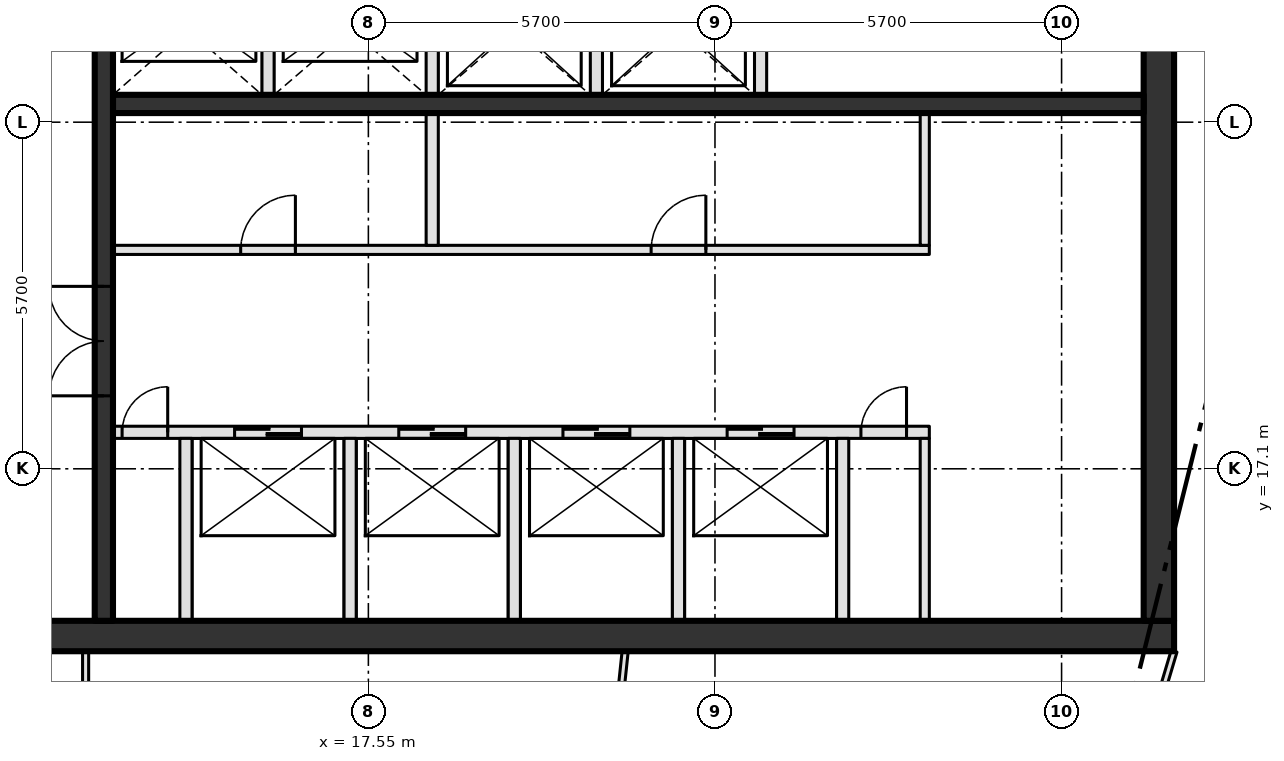
"""IFC4 building model, lengths in metres.
Left out: names, types, materials, properties, quantities, classifications, styles, units other than length and angle.
Written with IfcOpenShell. Run it as: python <this file> out.ifc"""

import sys

from ifc_helpers import new_model, si_unit, direction, frame, frame_2d, origin, place, context, subcontext, project, spatial, rectangle, extrude, element, fill, save


model = new_model("IFC4")
c1 = context("Model", 3, precision=1e-05, world=origin(), true_north=direction((0.0, 1.0)))
c2 = subcontext(c1, "Body", "Model", "MODEL_VIEW")
j1 = project(units=[si_unit("LENGTHUNIT", "METRE"), si_unit("PLANEANGLEUNIT", "RADIAN")], contexts=[c1])
p1 = place(None, origin())
s1 = spatial("IfcSite", under=j1, at=p1, CompositionType="ELEMENT")
p2 = place(p1, origin())
s2 = spatial("IfcBuilding", under=s1, at=p2, CompositionType="ELEMENT")
p3 = place(p2, frame((0.0, 0.0, 387.6)))
s3 = spatial("IfcBuildingStorey", under=s2, at=p3, CompositionType="ELEMENT", Elevation=387.6)
p4 = place(p3, frame((8.0, 14.35, -0.3), z_axis=(0.0, 0.0, 1.0), x_axis=(1.0, 0.0, 0.0)))
e1 = element("IfcWall", 1, at=p4, inside=s3, PredefinedType="SHEAR", context=c2, shape_type="SweptSolid", body=[
    extrude(rectangle(XDim=22.8, YDim=0.5, at=frame_2d((11.4, 0.0))), origin(), (0.0, 0.0, 1.0), 4.2),
])
p5 = place(p4, frame((2.3, 0.0, 0.3)))
e2 = element("IfcOpeningElement", 2, at=p5, cuts=e1, PredefinedType="OPENING", context=c2, shape_type="SweptSolid", body=[
    extrude(rectangle(XDim=1.8, YDim=2.1, at=frame_2d((0.9, 1.05))), frame((0.0, 0.26, 0.0), z_axis=(0.0, -1.0, 0.0), x_axis=(1.0, 0.0, 0.0)), (0.0, 0.0, 1.0), 0.52),
])
p6 = place(p3, frame((30.55, 14.6, -0.3), z_axis=(0.0, 0.0, 1.0), x_axis=(0.0, 1.0, 0.0)))
e3 = element("IfcWall", 3, at=p6, inside=s3, PredefinedType="SHEAR", context=c2, shape_type="SweptSolid", body=[
    extrude(rectangle(XDim=21.1, YDim=0.5, at=frame_2d((10.55, 0.0))), origin(), (0.0, 0.0, 1.0), 4.2),
])
p7 = place(p3, frame((13.35, 17.7, 0.0), z_axis=(0.0, 0.0, 1.0), x_axis=(1.0, 0.0, 0.0)))
e4 = element("IfcWall", 4, at=p7, inside=s3, PredefinedType="SOLIDWALL", context=c2, shape_type="SweptSolid", body=[
    extrude(rectangle(XDim=13.425, YDim=0.2, at=frame_2d((6.712, 0.0))), origin(), (0.0, 0.0, 1.0), 3.9),
])
p8 = place(p7, frame((2.0, 0.0, 0.0)))
e5 = element("IfcOpeningElement", 5, at=p8, cuts=e4, PredefinedType="OPENING", context=c2, shape_type="SweptSolid", body=[
    extrude(rectangle(XDim=1.1, YDim=2.1, at=frame_2d((0.55, 1.05))), frame((0.0, 0.11, 0.0), z_axis=(0.0, -1.0, 0.0), x_axis=(1.0, 0.0, 0.0)), (0.0, 0.0, 1.0), 0.22),
])
p9 = place(p7, frame((4.7, 0.0, 0.0)))
e6 = element("IfcOpeningElement", 6, at=p9, cuts=e4, PredefinedType="OPENING", context=c2, shape_type="SweptSolid", body=[
    extrude(rectangle(XDim=1.1, YDim=2.1, at=frame_2d((0.55, 1.05))), frame((0.0, 0.11, 0.0), z_axis=(0.0, -1.0, 0.0), x_axis=(1.0, 0.0, 0.0)), (0.0, 0.0, 1.0), 0.22),
])
p10 = place(p7, frame((7.4, 0.0, 0.0)))
e7 = element("IfcOpeningElement", 7, at=p10, cuts=e4, PredefinedType="OPENING", context=c2, shape_type="SweptSolid", body=[
    extrude(rectangle(XDim=1.1, YDim=2.1, at=frame_2d((0.55, 1.05))), frame((0.0, 0.11, 0.0), z_axis=(0.0, -1.0, 0.0), x_axis=(1.0, 0.0, 0.0)), (0.0, 0.0, 1.0), 0.22),
])
p11 = place(p7, frame((10.1, 0.0, 0.0)))
e8 = element("IfcOpeningElement", 8, at=p11, cuts=e4, PredefinedType="OPENING", context=c2, shape_type="SweptSolid", body=[
    extrude(rectangle(XDim=1.1, YDim=2.1, at=frame_2d((0.55, 1.05))), frame((0.0, 0.11, 0.0), z_axis=(0.0, -1.0, 0.0), x_axis=(1.0, 0.0, 0.0)), (0.0, 0.0, 1.0), 0.22),
])
p12 = place(p7, frame((0.15, 0.0, 0.0)))
e9 = element("IfcOpeningElement", 9, at=p12, cuts=e4, PredefinedType="OPENING", context=c2, shape_type="SweptSolid", body=[
    extrude(rectangle(XDim=0.75, YDim=2.1, at=frame_2d((0.375, 1.05))), frame((0.0, 0.11, 0.0), z_axis=(0.0, -1.0, 0.0), x_axis=(1.0, 0.0, 0.0)), (0.0, 0.0, 1.0), 0.22),
])
p13 = place(p7, frame((12.3, 0.0, 0.0)))
e10 = element("IfcOpeningElement", 10, at=p13, cuts=e4, PredefinedType="OPENING", context=c2, shape_type="SweptSolid", body=[
    extrude(rectangle(XDim=0.75, YDim=2.1, at=frame_2d((0.375, 1.05))), frame((0.0, 0.11, 0.0), z_axis=(0.0, -1.0, 0.0), x_axis=(1.0, 0.0, 0.0)), (0.0, 0.0, 1.0), 0.22),
])
p14 = place(p3, frame((13.35, 20.7, 0.0), z_axis=(0.0, 0.0, 1.0), x_axis=(1.0, 0.0, 0.0)))
e11 = element("IfcWall", 11, at=p14, inside=s3, PredefinedType="PARTITIONING", context=c2, shape_type="SweptSolid", body=[
    extrude(rectangle(XDim=13.425, YDim=0.15, at=frame_2d((6.712, 0.0))), origin(), (0.0, 0.0, 1.0), 3.9),
])
p15 = place(p14, frame((2.1, 0.0, 0.0)))
e12 = element("IfcOpeningElement", 12, at=p15, cuts=e11, PredefinedType="OPENING", context=c2, shape_type="SweptSolid", body=[
    extrude(rectangle(XDim=0.9, YDim=2.1, at=frame_2d((0.45, 1.05))), frame((0.0, 0.085, 0.0), z_axis=(0.0, -1.0, 0.0), x_axis=(1.0, 0.0, 0.0)), (0.0, 0.0, 1.0), 0.17),
])
p16 = place(p14, frame((8.85, 0.0, 0.0)))
e13 = element("IfcOpeningElement", 13, at=p16, cuts=e11, PredefinedType="OPENING", context=c2, shape_type="SweptSolid", body=[
    extrude(rectangle(XDim=0.9, YDim=2.1, at=frame_2d((0.45, 1.05))), frame((0.0, 0.085, 0.0), z_axis=(0.0, -1.0, 0.0), x_axis=(1.0, 0.0, 0.0)), (0.0, 0.0, 1.0), 0.17),
])
p17 = place(p3, frame((13.35, 23.1, 0.0), z_axis=(0.0, 0.0, 1.0), x_axis=(1.0, 0.0, 0.0)))
e14 = element("IfcWall", 14, at=p17, inside=s3, PredefinedType="SHEAR", context=c2, shape_type="SweptSolid", body=[
    extrude(rectangle(XDim=16.95, YDim=0.3, at=frame_2d((8.475, 0.0))), origin(), (0.0, 0.0, 1.0), 3.9),
])
p18 = place(p3, frame((13.2, 14.6, 0.0), z_axis=(0.0, 0.0, 1.0), x_axis=(0.0, 1.0, 0.0)))
e15 = element("IfcWall", 15, at=p18, inside=s3, PredefinedType="SHEAR", context=c2, shape_type="SweptSolid", body=[
    extrude(rectangle(XDim=21.1, YDim=0.3, at=frame_2d((10.55, 0.0))), origin(), (0.0, 0.0, 1.0), 3.9),
])
p19 = place(p18, frame((3.7, 0.0, 0.0)))
e16 = element("IfcOpeningElement", 16, at=p19, cuts=e15, PredefinedType="OPENING", context=c2, shape_type="SweptSolid", body=[
    extrude(rectangle(XDim=1.8, YDim=2.1, at=frame_2d((0.9, 1.05))), frame((0.0, 0.16, 0.0), z_axis=(0.0, -1.0, 0.0), x_axis=(1.0, 0.0, 0.0)), (0.0, 0.0, 1.0), 0.32),
])
p20 = place(p18, frame((11.8, 0.0, 0.0)))
e17 = element("IfcOpeningElement", 17, at=p20, cuts=e15, PredefinedType="OPENING", context=c2, shape_type="SweptSolid", body=[
    extrude(rectangle(XDim=1.2, YDim=2.1, at=frame_2d((0.6, 1.05))), frame((0.0, 0.16, 0.0), z_axis=(0.0, -1.0, 0.0), x_axis=(1.0, 0.0, 0.0)), (0.0, 0.0, 1.0), 0.32),
])
p21 = place(p3, frame((14.55, 14.6, 0.0), z_axis=(0.0, 0.0, 1.0), x_axis=(0.0, 1.0, 0.0)))
e18 = element("IfcWall", 18, at=p21, inside=s3, PredefinedType="SOLIDWALL", context=c2, shape_type="SweptSolid", body=[
    extrude(rectangle(XDim=3.0, YDim=0.2, at=frame_2d((1.5, 0.0))), origin(), (0.0, 0.0, 1.0), 3.9),
])
p22 = place(p3, frame((15.9, 23.25, 0.0), z_axis=(0.0, 0.0, 1.0), x_axis=(0.0, 1.0, 0.0)))
e19 = element("IfcWall", 19, at=p22, inside=s3, PredefinedType="SOLIDWALL", context=c2, shape_type="SweptSolid", body=[
    extrude(rectangle(XDim=2.15, YDim=0.2, at=frame_2d((1.075, 0.0))), origin(), (0.0, 0.0, 1.0), 3.9),
])
p23 = place(p3, frame((17.25, 14.6, 0.0), z_axis=(0.0, 0.0, 1.0), x_axis=(0.0, 1.0, 0.0)))
e20 = element("IfcWall", 20, at=p23, inside=s3, PredefinedType="SOLIDWALL", context=c2, shape_type="SweptSolid", body=[
    extrude(rectangle(XDim=3.0, YDim=0.2, at=frame_2d((1.5, 0.0))), origin(), (0.0, 0.0, 1.0), 3.9),
])
p24 = place(p3, frame((18.6, 20.775, 0.0), z_axis=(0.0, 0.0, 1.0), x_axis=(0.0, 1.0, 0.0)))
e21 = element("IfcWall", 21, at=p24, inside=s3, PredefinedType="SOLIDWALL", context=c2, shape_type="SweptSolid", body=[
    extrude(rectangle(XDim=7.625, YDim=0.2, at=frame_2d((3.812, 0.0))), origin(), (0.0, 0.0, 1.0), 3.9),
])
p25 = place(p24, frame((5.625, 0.0, 0.0)))
e22 = element("IfcOpeningElement", 22, at=p25, cuts=e21, PredefinedType="OPENING", context=c2, shape_type="SweptSolid", body=[
    extrude(rectangle(XDim=1.2, YDim=2.1, at=frame_2d((0.6, 1.05))), frame((0.0, 0.11, 0.0), z_axis=(0.0, -1.0, 0.0), x_axis=(1.0, 0.0, 0.0)), (0.0, 0.0, 1.0), 0.22),
])
p26 = place(p3, frame((19.95, 14.6, 0.0), z_axis=(0.0, 0.0, 1.0), x_axis=(0.0, 1.0, 0.0)))
e23 = element("IfcWall", 23, at=p26, inside=s3, PredefinedType="SOLIDWALL", context=c2, shape_type="SweptSolid", body=[
    extrude(rectangle(XDim=3.0, YDim=0.2, at=frame_2d((1.5, 0.0))), origin(), (0.0, 0.0, 1.0), 3.9),
])
p27 = place(p3, frame((21.3, 23.25, 0.0), z_axis=(0.0, 0.0, 1.0), x_axis=(0.0, 1.0, 0.0)))
e24 = element("IfcWall", 24, at=p27, inside=s3, PredefinedType="SOLIDWALL", context=c2, shape_type="SweptSolid", body=[
    extrude(rectangle(XDim=2.15, YDim=0.2, at=frame_2d((1.075, 0.0))), origin(), (0.0, 0.0, 1.0), 3.9),
])
p28 = place(p3, frame((22.65, 14.6, 0.0), z_axis=(0.0, 0.0, 1.0), x_axis=(0.0, 1.0, 0.0)))
e25 = element("IfcWall", 25, at=p28, inside=s3, PredefinedType="SOLIDWALL", context=c2, shape_type="SweptSolid", body=[
    extrude(rectangle(XDim=3.0, YDim=0.2, at=frame_2d((1.5, 0.0))), origin(), (0.0, 0.0, 1.0), 3.9),
])
p29 = place(p3, frame((24.0, 23.25, 0.0), z_axis=(0.0, 0.0, 1.0), x_axis=(0.0, 1.0, 0.0)))
e26 = element("IfcWall", 26, at=p29, inside=s3, PredefinedType="SOLIDWALL", context=c2, shape_type="SweptSolid", body=[
    extrude(rectangle(XDim=2.15, YDim=0.2, at=frame_2d((1.075, 0.0))), origin(), (0.0, 0.0, 1.0), 3.9),
])
p30 = place(p3, frame((25.35, 14.6, 0.0), z_axis=(0.0, 0.0, 1.0), x_axis=(0.0, 1.0, 0.0)))
e27 = element("IfcWall", 27, at=p30, inside=s3, PredefinedType="SOLIDWALL", context=c2, shape_type="SweptSolid", body=[
    extrude(rectangle(XDim=3.0, YDim=0.2, at=frame_2d((1.5, 0.0))), origin(), (0.0, 0.0, 1.0), 3.9),
])
p31 = place(p3, frame((26.7, 14.6, 0.0), z_axis=(0.0, 0.0, 1.0), x_axis=(0.0, 1.0, 0.0)))
e28 = element("IfcWall", 28, at=p31, inside=s3, PredefinedType="PARTITIONING", context=c2, shape_type="SweptSolid", body=[
    extrude(rectangle(XDim=3.0, YDim=0.15, at=frame_2d((1.5, 0.0))), origin(), (0.0, 0.0, 1.0), 3.9),
])
p32 = place(p3, frame((26.7, 20.775, 0.0), z_axis=(0.0, 0.0, 1.0), x_axis=(0.0, 1.0, 0.0)))
e29 = element("IfcWall", 29, at=p32, inside=s3, PredefinedType="PARTITIONING", context=c2, shape_type="SweptSolid", body=[
    extrude(rectangle(XDim=2.175, YDim=0.15, at=frame_2d((1.087, 0.0))), origin(), (0.0, 0.0, 1.0), 3.9),
])
p33 = place(p3, frame((12.9, 10.078, 0.0), z_axis=(0.0, 0.0, 1.0), x_axis=(0.0, 1.0, 0.0)))
e30 = element("IfcWall", 30, at=p33, inside=s3, PredefinedType="PARTITIONING", context=c2, shape_type="SweptSolid", body=[
    extrude(rectangle(XDim=4.022, YDim=0.1, at=frame_2d((2.011, 0.0))), origin(), (0.0, 0.0, 1.0), 3.9),
])
p34 = place(p33, frame((1.58, 0.0, 0.0)))
e31 = element("IfcOpeningElement", 31, at=p34, cuts=e30, PredefinedType="OPENING", context=c2, shape_type="SweptSolid", body=[
    extrude(rectangle(XDim=1.0, YDim=2.1, at=frame_2d((0.5, 1.05))), frame((0.0, 0.06, 0.0), z_axis=(0.0, -1.0, 0.0), x_axis=(1.0, 0.0, 0.0)), (0.0, 0.0, 1.0), 0.12),
])
p35 = place(p3, frame((30.8, 14.1, 0.0), z_axis=(0.0, 0.0, 1.0), x_axis=(-0.286170650389, -0.958178667502, 0.0)))
e32 = element("IfcWall", 32, at=p35, inside=s3, PredefinedType="PARTITIONING", context=c2, shape_type="SweptSolid", body=[
    extrude(rectangle(XDim=8.716, YDim=0.1, at=frame_2d((4.358, 0.0))), origin(), (0.0, 0.0, 1.0), 3.9),
])
p36 = place(p35, frame((3.58, 0.0, 0.0)))
e33 = element("IfcOpeningElement", 33, at=p36, cuts=e32, PredefinedType="OPENING", context=c2, shape_type="SweptSolid", body=[
    extrude(rectangle(XDim=1.0, YDim=2.1, at=frame_2d((0.5, 1.05))), frame((0.0, 0.06, 0.0), z_axis=(0.0, -1.0, 0.0), x_axis=(1.0, 0.0, 0.0)), (0.0, 0.0, 1.0), 0.12),
])
p37 = place(p3, frame((21.09, 7.606, 0.0), z_axis=(0.0, 0.0, 1.0), x_axis=(0.104573849471, 0.994517124039, 0.0)))
e34 = element("IfcWall", 34, at=p37, inside=s3, PredefinedType="PARTITIONING", context=c2, shape_type="SweptSolid", body=[
    extrude(rectangle(XDim=6.53, YDim=0.1, at=frame_2d((3.265, 0.0))), origin(), (0.0, 0.0, 1.0), 3.9),
])
p38 = place(p8, origin())
e35 = element("IfcDoor", 35, at=p38, inside=s3, OperationType="SLIDING_TO_LEFT", PredefinedType="DOOR", context=c2, shape_type="SweptSolid", body=[
    extrude(rectangle(XDim=1.1, YDim=2.1, at=frame_2d((0.55, 1.05))), frame((0.0, 0.025, 0.0), z_axis=(0.0, -1.0, 0.0), x_axis=(1.0, 0.0, 0.0)), (0.0, 0.0, 1.0), 0.05),
])
fill(e5, e35)
p39 = place(p9, origin())
e36 = element("IfcDoor", 36, at=p39, inside=s3, OperationType="SLIDING_TO_LEFT", PredefinedType="DOOR", context=c2, shape_type="SweptSolid", body=[
    extrude(rectangle(XDim=1.1, YDim=2.1, at=frame_2d((0.55, 1.05))), frame((0.0, 0.025, 0.0), z_axis=(0.0, -1.0, 0.0), x_axis=(1.0, 0.0, 0.0)), (0.0, 0.0, 1.0), 0.05),
])
fill(e6, e36)
p40 = place(p10, origin())
e37 = element("IfcDoor", 37, at=p40, inside=s3, OperationType="SLIDING_TO_LEFT", PredefinedType="DOOR", context=c2, shape_type="SweptSolid", body=[
    extrude(rectangle(XDim=1.1, YDim=2.1, at=frame_2d((0.55, 1.05))), frame((0.0, 0.025, 0.0), z_axis=(0.0, -1.0, 0.0), x_axis=(1.0, 0.0, 0.0)), (0.0, 0.0, 1.0), 0.05),
])
fill(e7, e37)
p41 = place(p11, origin())
e38 = element("IfcDoor", 38, at=p41, inside=s3, OperationType="SLIDING_TO_LEFT", PredefinedType="DOOR", context=c2, shape_type="SweptSolid", body=[
    extrude(rectangle(XDim=1.1, YDim=2.1, at=frame_2d((0.55, 1.05))), frame((0.0, 0.025, 0.0), z_axis=(0.0, -1.0, 0.0), x_axis=(1.0, 0.0, 0.0)), (0.0, 0.0, 1.0), 0.05),
])
fill(e8, e38)
p42 = place(p12, origin())
e39 = element("IfcDoor", 39, at=p42, inside=s3, OperationType="SINGLE_SWING_RIGHT", PredefinedType="DOOR", context=c2, shape_type="SweptSolid", body=[
    extrude(rectangle(XDim=0.75, YDim=2.1, at=frame_2d((0.375, 1.05))), frame((0.0, 0.025, 0.0), z_axis=(0.0, -1.0, 0.0), x_axis=(1.0, 0.0, 0.0)), (0.0, 0.0, 1.0), 0.05),
])
fill(e9, e39)
p43 = place(p13, origin())
e40 = element("IfcDoor", 40, at=p43, inside=s3, OperationType="SINGLE_SWING_RIGHT", PredefinedType="DOOR", context=c2, shape_type="SweptSolid", body=[
    extrude(rectangle(XDim=0.75, YDim=2.1, at=frame_2d((0.375, 1.05))), frame((0.0, 0.025, 0.0), z_axis=(0.0, -1.0, 0.0), x_axis=(1.0, 0.0, 0.0)), (0.0, 0.0, 1.0), 0.05),
])
fill(e10, e40)
p44 = place(p15, origin())
e41 = element("IfcDoor", 41, at=p44, inside=s3, OperationType="SINGLE_SWING_RIGHT", PredefinedType="DOOR", context=c2, shape_type="SweptSolid", body=[
    extrude(rectangle(XDim=0.9, YDim=2.1, at=frame_2d((0.45, 1.05))), frame((0.0, 0.025, 0.0), z_axis=(0.0, -1.0, 0.0), x_axis=(1.0, 0.0, 0.0)), (0.0, 0.0, 1.0), 0.05),
])
fill(e12, e41)
p45 = place(p16, origin())
e42 = element("IfcDoor", 42, at=p45, inside=s3, OperationType="SINGLE_SWING_RIGHT", PredefinedType="DOOR", context=c2, shape_type="SweptSolid", body=[
    extrude(rectangle(XDim=0.9, YDim=2.1, at=frame_2d((0.45, 1.05))), frame((0.0, 0.025, 0.0), z_axis=(0.0, -1.0, 0.0), x_axis=(1.0, 0.0, 0.0)), (0.0, 0.0, 1.0), 0.05),
])
fill(e13, e42)
p46 = place(p19, origin())
e43 = element("IfcDoor", 43, at=p46, inside=s3, OperationType="DOUBLE_DOOR_SINGLE_SWING", PredefinedType="DOOR", context=c2, shape_type="SweptSolid", body=[
    extrude(rectangle(XDim=1.8, YDim=2.1, at=frame_2d((0.9, 1.05))), frame((0.0, 0.025, 0.0), z_axis=(0.0, -1.0, 0.0), x_axis=(1.0, 0.0, 0.0)), (0.0, 0.0, 1.0), 0.05),
])
fill(e16, e43)
save(model, sys.argv[1])
